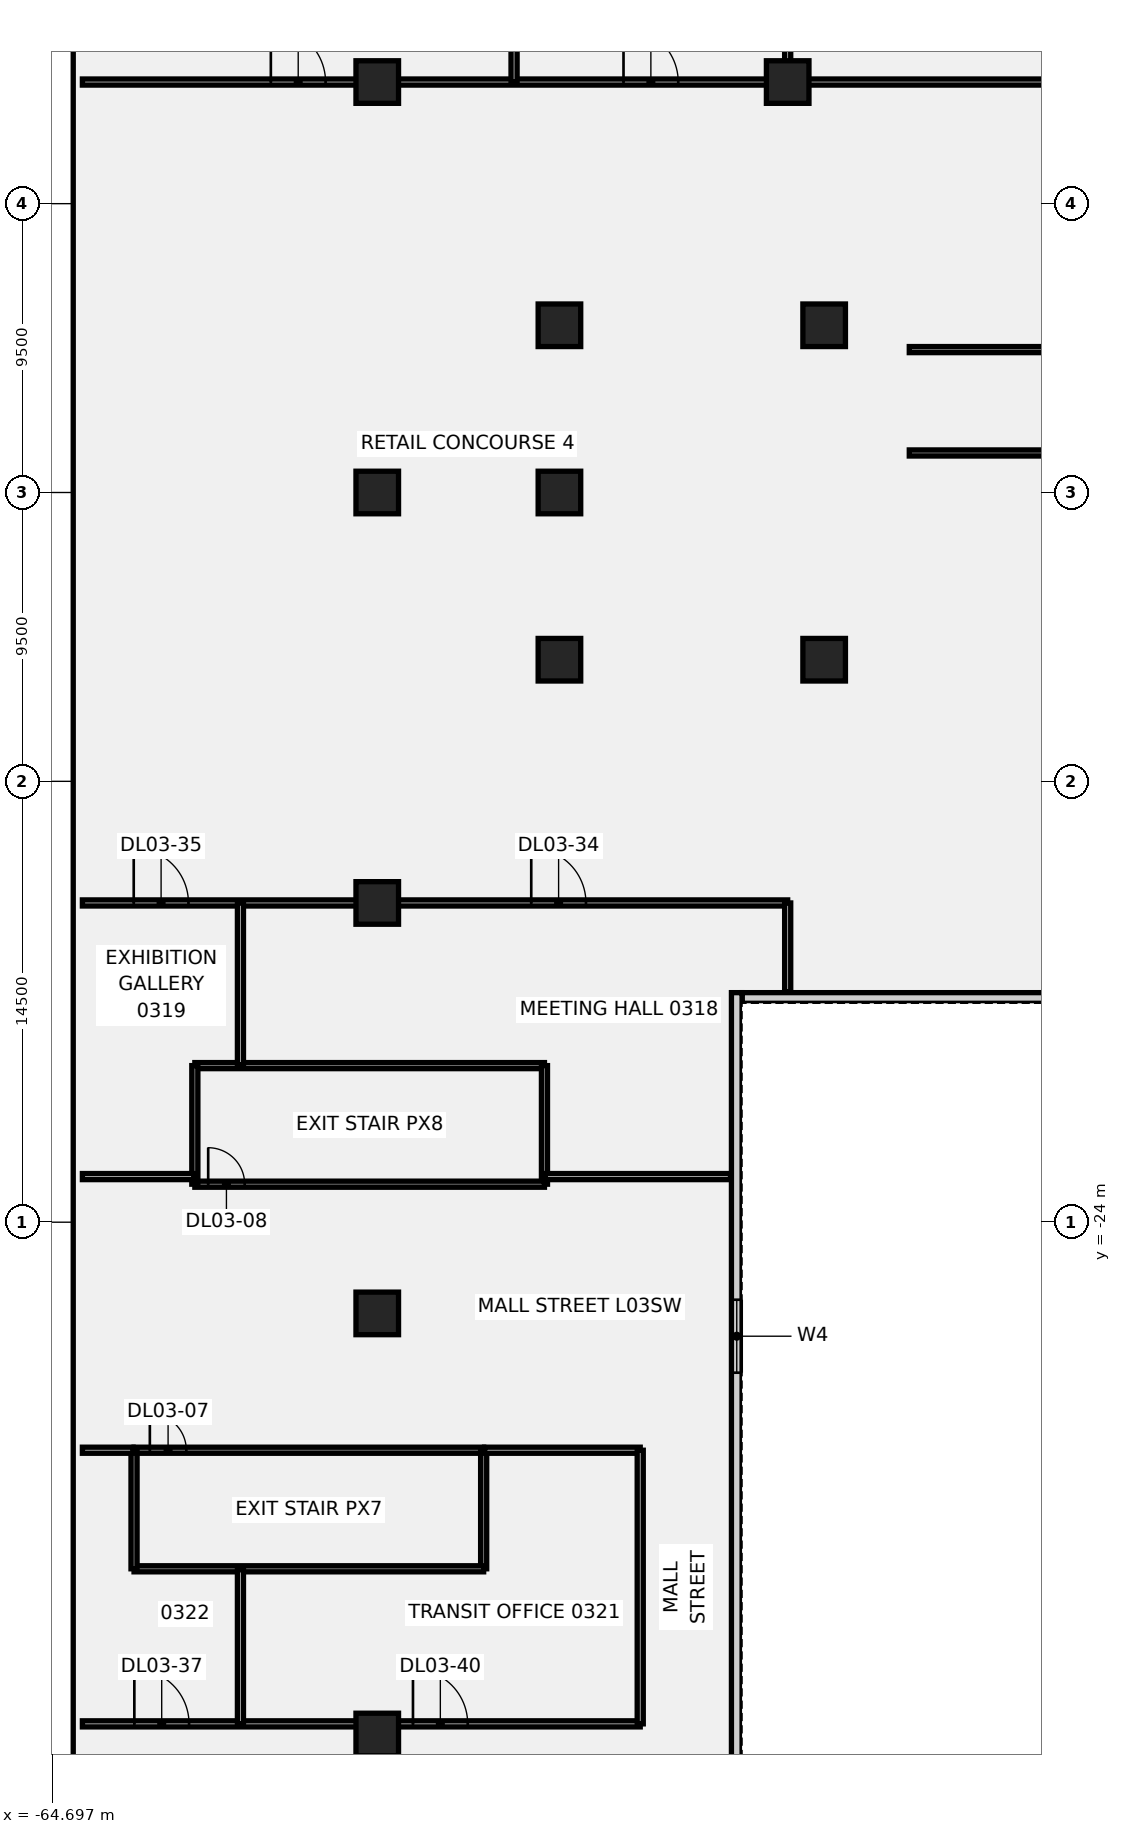
"""IFC4 building model, lengths in metres.
Left out: names, types, materials, properties, quantities, classifications, styles, units other than length and angle.
Written with IfcOpenShell. Run it as: python <this file> out.ifc"""

import sys

from ifc_helpers import new_model, si_unit, direction, frame, frame_2d, origin, origin_2d, place, context, subcontext, project, spatial, polyline, rectangle, outline, extrude, element, fill, save


model = new_model("IFC4")
c1 = context("Model", 3, precision=1e-05, world=origin(), true_north=direction((0.0, 1.0)))
c2 = subcontext(c1, "Body", "Model", "MODEL_VIEW")
j1 = project(units=[si_unit("LENGTHUNIT", "METRE"), si_unit("PLANEANGLEUNIT", "RADIAN")], contexts=[c1])
p1 = place(None, origin())
s1 = spatial("IfcSite", under=j1, at=p1, CompositionType="ELEMENT")
p2 = place(p1, origin())
s2 = spatial("IfcBuilding", under=s1, at=p2, CompositionType="ELEMENT")
p3 = place(p2, frame((0.0, 0.0, 20.0)))
s3 = spatial("IfcBuildingStorey", under=s2, at=p3, CompositionType="ELEMENT", Elevation=20.0)
for number, where, z_axis, x_axis in (
    (1, (-39.3, -5.5, -0.5), (0.0, 0.0, 1.0), (1.0, 0.0, 0.0)),
    (2, (-39.3, 5.5, -0.5), (0.0, 0.0, 1.0), (1.0, 0.0, 0.0)),
    (3, (-48.008, 5.5, -0.5), (0.0, 0.0, 1.0), (1.0, 0.0, 0.0)),
    (4, (-48.008, 0.0, -0.5), (0.0, 0.0, 1.0), (1.0, 0.0, 0.0)),
    (5, (-48.008, -5.5, -0.5), (0.0, 0.0, 1.0), (1.0, 0.0, 0.0)),
    (6, (-54.0, -40.85, -0.5), (0.0, 0.0, 1.0), (1.0, 0.0, 0.0)),
    (7, (-54.0, -27.0, -0.5), (0.0, 0.0, 1.0), (1.0, 0.0, 0.0)),
    (8, (-54.0, -13.5, -0.5), (0.0, 0.0, 1.0), (1.0, 0.0, 0.0)),
    (9, (-54.0, 0.0, -0.5), (0.0, 0.0, 1.0), (1.0, 0.0, 0.0)),
    (10, (-54.0, 13.5, -0.5), (0.0, 0.0, 1.0), (1.0, 0.0, 0.0)),
    (11, (-40.5, 13.5, -0.5), (0.0, 0.0, 1.0), (1.0, 0.0, 0.0)),
):
    element("IfcColumn", number, at=place(p3, frame(where, z_axis=z_axis, x_axis=x_axis)), inside=s3, PredefinedType="COLUMN", context=c2, shape_type="SweptSolid", body=[
        extrude(rectangle(XDim=1.4, YDim=1.4, at=origin_2d()), origin(), (0.0, 0.0, 1.0), 5.05),
    ])
p4 = place(p3, frame((-62.0, -31.5, 0.0), z_axis=(0.0, 0.0, 1.0), x_axis=(1.0, 0.0, 0.0)))
e12 = element("IfcWall", 12, at=p4, inside=s3, PredefinedType="PARTITIONING", context=c2, shape_type="SweptSolid", body=[
    extrude(rectangle(XDim=11.5, YDim=0.2, at=frame_2d((5.75, 0.0))), origin(), (0.0, 0.0, 1.0), 4.55),
])
p5 = place(p4, frame((0.52, 0.0, 0.0)))
e13 = element("IfcOpeningElement", 13, at=p5, cuts=e12, PredefinedType="OPENING", context=c2, shape_type="SweptSolid", body=[
    extrude(rectangle(XDim=1.2, YDim=2.1, at=frame_2d((0.6, 1.05))), frame((0.0, 0.11, 0.0), z_axis=(0.0, -1.0, 0.0), x_axis=(1.0, 0.0, 0.0)), (0.0, 0.0, 1.0), 0.22),
])
p6 = place(p3, frame((-50.5, -35.4, 0.0), z_axis=(0.0, 0.0, 1.0), x_axis=(0.0, 1.0, 0.0)))
e14 = element("IfcWall", 14, at=p6, inside=s3, PredefinedType="PARTITIONING", context=c2, shape_type="SweptSolid", body=[
    extrude(rectangle(XDim=3.9, YDim=0.2, at=frame_2d((1.95, 0.0))), origin(), (0.0, 0.0, 1.0), 4.55),
])
p7 = place(p3, frame((-62.0, -35.4, 0.0), z_axis=(0.0, 0.0, 1.0), x_axis=(1.0, 0.0, 0.0)))
e15 = element("IfcWall", 15, at=p7, inside=s3, PredefinedType="PARTITIONING", context=c2, shape_type="SweptSolid", body=[
    extrude(rectangle(XDim=11.5, YDim=0.2, at=frame_2d((5.75, 0.0))), origin(), (0.0, 0.0, 1.0), 4.55),
])
p8 = place(p3, frame((-62.0, -35.4, 0.0), z_axis=(0.0, 0.0, 1.0), x_axis=(0.0, 1.0, 0.0)))
e16 = element("IfcWall", 16, at=p8, inside=s3, PredefinedType="PARTITIONING", context=c2, shape_type="SweptSolid", body=[
    extrude(rectangle(XDim=3.9, YDim=0.2, at=frame_2d((1.95, 0.0))), origin(), (0.0, 0.0, 1.0), 4.55),
])
p9 = place(p3, frame((-60.0, -18.85, 0.0), z_axis=(0.0, 0.0, 1.0), x_axis=(1.0, 0.0, 0.0)))
e17 = element("IfcWall", 17, at=p9, inside=s3, PredefinedType="PARTITIONING", context=c2, shape_type="SweptSolid", body=[
    extrude(rectangle(XDim=11.5, YDim=0.2, at=frame_2d((5.75, 0.0))), origin(), (0.0, 0.0, 1.0), 4.55),
])
p10 = place(p3, frame((-48.5, -22.75, 0.0), z_axis=(0.0, 0.0, 1.0), x_axis=(0.0, 1.0, 0.0)))
e18 = element("IfcWall", 18, at=p10, inside=s3, PredefinedType="PARTITIONING", context=c2, shape_type="SweptSolid", body=[
    extrude(rectangle(XDim=3.9, YDim=0.2, at=frame_2d((1.95, 0.0))), origin(), (0.0, 0.0, 1.0), 4.55),
])
p11 = place(p3, frame((-60.0, -22.75, 0.0), z_axis=(0.0, 0.0, 1.0), x_axis=(1.0, 0.0, 0.0)))
e19 = element("IfcWall", 19, at=p11, inside=s3, PredefinedType="PARTITIONING", context=c2, shape_type="SweptSolid", body=[
    extrude(rectangle(XDim=11.5, YDim=0.2, at=frame_2d((5.75, 0.0))), origin(), (0.0, 0.0, 1.0), 4.55),
])
p12 = place(p11, frame((0.439, 0.0, 0.0)))
e20 = element("IfcOpeningElement", 20, at=p12, cuts=e19, PredefinedType="OPENING", context=c2, shape_type="SweptSolid", body=[
    extrude(rectangle(XDim=1.2, YDim=2.1, at=frame_2d((0.6, 1.05))), frame((0.0, 0.11, 0.0), z_axis=(0.0, -1.0, 0.0), x_axis=(1.0, 0.0, 0.0)), (0.0, 0.0, 1.0), 0.22),
])
p13 = place(p3, frame((-60.0, -22.75, 0.0), z_axis=(0.0, 0.0, 1.0), x_axis=(0.0, 1.0, 0.0)))
e21 = element("IfcWall", 21, at=p13, inside=s3, PredefinedType="PARTITIONING", context=c2, shape_type="SweptSolid", body=[
    extrude(rectangle(XDim=3.9, YDim=0.2, at=frame_2d((1.95, 0.0))), origin(), (0.0, 0.0, 1.0), 4.55),
])
p14 = place(p3, frame((-63.699, -40.5, 0.0), z_axis=(0.0, 0.0, 1.0), x_axis=(1.0, 0.0, 0.0)))
e22 = element("IfcWall", 22, at=p14, inside=s3, PredefinedType="PARTITIONING", context=c2, shape_type="SweptSolid", body=[
    extrude(rectangle(XDim=18.349, YDim=0.2, at=frame_2d((9.174, 0.0))), origin(), (0.0, 0.0, 1.0), 4.55),
])
p15 = place(p14, frame((1.709, 0.0, 0.0)))
e23 = element("IfcOpeningElement", 23, at=p15, cuts=e22, PredefinedType="OPENING", context=c2, shape_type="SweptSolid", body=[
    extrude(rectangle(XDim=1.8, YDim=2.1, at=frame_2d((0.9, 1.05))), frame((0.0, 0.11, 0.0), z_axis=(0.0, -1.0, 0.0), x_axis=(1.0, 0.0, 0.0)), (0.0, 0.0, 1.0), 0.22),
])
p16 = place(p14, frame((10.874, 0.0, 0.0)))
e24 = element("IfcOpeningElement", 24, at=p16, cuts=e22, PredefinedType="OPENING", context=c2, shape_type="SweptSolid", body=[
    extrude(rectangle(XDim=1.8, YDim=2.1, at=frame_2d((0.9, 1.05))), frame((0.0, 0.11, 0.0), z_axis=(0.0, -1.0, 0.0), x_axis=(1.0, 0.0, 0.0)), (0.0, 0.0, 1.0), 0.22),
])
p17 = place(p3, frame((-63.699, -31.5, 0.0), z_axis=(0.0, 0.0, 1.0), x_axis=(1.0, 0.0, 0.0)))
e25 = element("IfcWall", 25, at=p17, inside=s3, PredefinedType="PARTITIONING", context=c2, shape_type="SweptSolid", body=[
    extrude(rectangle(XDim=1.669, YDim=0.2, at=frame_2d((0.834, 0.0))), origin(), (0.0, 0.0, 1.0), 4.55),
])
p18 = place(p3, frame((-63.699, -22.5, 0.0), z_axis=(0.0, 0.0, 1.0), x_axis=(1.0, 0.0, 0.0)))
e26 = element("IfcWall", 26, at=p18, inside=s3, PredefinedType="PARTITIONING", context=c2, shape_type="SweptSolid", body=[
    extrude(rectangle(XDim=3.669, YDim=0.2, at=frame_2d((1.834, 0.0))), origin(), (0.0, 0.0, 1.0), 4.55),
])
p19 = place(p3, frame((-63.699, -13.5, 0.0), z_axis=(0.0, 0.0, 1.0), x_axis=(1.0, 0.0, 0.0)))
e27 = element("IfcWall", 27, at=p19, inside=s3, PredefinedType="PARTITIONING", context=c2, shape_type="SweptSolid", body=[
    extrude(rectangle(XDim=23.199, YDim=0.2, at=frame_2d((11.6, 0.0))), origin(), (0.0, 0.0, 1.0), 4.55),
])
p20 = place(p19, frame((14.764, 0.0, 0.0)))
e28 = element("IfcOpeningElement", 28, at=p20, cuts=e27, PredefinedType="OPENING", context=c2, shape_type="SweptSolid", body=[
    extrude(rectangle(XDim=1.8, YDim=2.1, at=frame_2d((0.9, 1.05))), frame((0.0, 0.11, 0.0), z_axis=(0.0, -1.0, 0.0), x_axis=(1.0, 0.0, 0.0)), (0.0, 0.0, 1.0), 0.22),
])
p21 = place(p19, frame((1.689, 0.0, 0.0)))
e29 = element("IfcOpeningElement", 29, at=p21, cuts=e27, PredefinedType="OPENING", context=c2, shape_type="SweptSolid", body=[
    extrude(rectangle(XDim=1.8, YDim=2.1, at=frame_2d((0.9, 1.05))), frame((0.0, 0.11, 0.0), z_axis=(0.0, -1.0, 0.0), x_axis=(1.0, 0.0, 0.0)), (0.0, 0.0, 1.0), 0.22),
])
p22 = place(p3, frame((-63.699, 13.5, 0.0), z_axis=(0.0, 0.0, 1.0), x_axis=(1.0, 0.0, 0.0)))
e30 = element("IfcWall", 30, at=p22, inside=s3, PredefinedType="PARTITIONING", context=c2, shape_type="SweptSolid", body=[
    extrude(rectangle(XDim=41.199, YDim=0.2, at=frame_2d((20.6, 0.0))), origin(), (0.0, 0.0, 1.0), 4.55),
])
p23 = place(p22, frame((17.799, 0.0, 0.0)))
e31 = element("IfcOpeningElement", 31, at=p23, cuts=e30, PredefinedType="OPENING", context=c2, shape_type="SweptSolid", body=[
    extrude(rectangle(XDim=1.8, YDim=2.1, at=frame_2d((0.9, 1.05))), frame((0.0, 0.11, 0.0), z_axis=(0.0, -1.0, 0.0), x_axis=(1.0, 0.0, 0.0)), (0.0, 0.0, 1.0), 0.22),
])
p24 = place(p22, frame((6.199, 0.0, 0.0)))
e32 = element("IfcOpeningElement", 32, at=p24, cuts=e30, PredefinedType="OPENING", context=c2, shape_type="SweptSolid", body=[
    extrude(rectangle(XDim=1.8, YDim=2.1, at=frame_2d((0.9, 1.05))), frame((0.0, 0.11, 0.0), z_axis=(0.0, -1.0, 0.0), x_axis=(1.0, 0.0, 0.0)), (0.0, 0.0, 1.0), 0.22),
])
p25 = place(p3, frame((-50.47, -31.5, 0.0), z_axis=(0.0, 0.0, 1.0), x_axis=(1.0, 0.0, 0.0)))
e33 = element("IfcWall", 33, at=p25, inside=s3, PredefinedType="PARTITIONING", context=c2, shape_type="SweptSolid", body=[
    extrude(rectangle(XDim=5.12, YDim=0.2, at=frame_2d((2.56, 0.0))), origin(), (0.0, 0.0, 1.0), 4.55),
])
p26 = place(p3, frame((-45.35, -40.5, 0.0), z_axis=(0.0, 0.0, 1.0), x_axis=(0.0, 1.0, 0.0)))
e34 = element("IfcWall", 34, at=p26, inside=s3, PredefinedType="PARTITIONING", context=c2, shape_type="SweptSolid", body=[
    extrude(rectangle(XDim=9.0, YDim=0.2, at=frame_2d((4.5, 0.0))), origin(), (0.0, 0.0, 1.0), 4.55),
])
p27 = place(p3, frame((-58.5, -40.5, 0.0), z_axis=(0.0, 0.0, 1.0), x_axis=(0.0, 1.0, 0.0)))
e35 = element("IfcWall", 35, at=p27, inside=s3, PredefinedType="PARTITIONING", context=c2, shape_type="SweptSolid", body=[
    extrude(rectangle(XDim=5.07, YDim=0.2, at=frame_2d((2.535, 0.0))), origin(), (0.0, 0.0, 1.0), 4.55),
])
p28 = place(p3, frame((-58.5, -18.82, 0.0), z_axis=(0.0, 0.0, 1.0), x_axis=(0.0, 1.0, 0.0)))
e36 = element("IfcWall", 36, at=p28, inside=s3, PredefinedType="PARTITIONING", context=c2, shape_type="SweptSolid", body=[
    extrude(rectangle(XDim=5.32, YDim=0.2, at=frame_2d((2.66, 0.0))), origin(), (0.0, 0.0, 1.0), 4.55),
])
p29 = place(p3, frame((-40.5, -16.42, 0.0), z_axis=(0.0, 0.0, 1.0), x_axis=(0.0, 1.0, 0.0)))
e37 = element("IfcWall", 37, at=p29, inside=s3, PredefinedType="PARTITIONING", context=c2, shape_type="SweptSolid", body=[
    extrude(rectangle(XDim=2.92, YDim=0.2, at=frame_2d((1.46, 0.0))), origin(), (0.0, 0.0, 1.0), 4.55),
])
p30 = place(p3, frame((-49.5, 13.5, 0.0), z_axis=(0.0, 0.0, 1.0), x_axis=(0.0, 1.0, 0.0)))
e38 = element("IfcWall", 38, at=p30, inside=s3, PredefinedType="PARTITIONING", context=c2, shape_type="SweptSolid", body=[
    extrude(rectangle(XDim=9.0, YDim=0.2, at=frame_2d((4.5, 0.0))), origin(), (0.0, 0.0, 1.0), 4.55),
])
p31 = place(p3, frame((-48.47, -22.5, 0.0), z_axis=(0.0, 0.0, 1.0), x_axis=(1.0, 0.0, 0.0)))
e39 = element("IfcWall", 39, at=p31, inside=s3, PredefinedType="PARTITIONING", context=c2, shape_type="SweptSolid", body=[
    extrude(rectangle(XDim=6.09, YDim=0.2, at=frame_2d((3.045, 0.0))), origin(), (0.0, 0.0, 1.0), 4.55),
])
p32 = place(p3, frame((-40.5, 13.5, 0.0), z_axis=(0.0, 0.0, 1.0), x_axis=(0.0, 1.0, 0.0)))
e40 = element("IfcWall", 40, at=p32, inside=s3, PredefinedType="PARTITIONING", context=c2, shape_type="SweptSolid", body=[
    extrude(rectangle(XDim=9.0, YDim=0.2, at=frame_2d((4.5, 0.0))), origin(), (0.0, 0.0, 1.0), 4.55),
])
p33 = place(p3, frame((-42.0, -16.625, 0.0), z_axis=(0.0, 0.0, 1.0), x_axis=(1.0, 0.0, 0.0)))
e41 = element("IfcWall", 41, at=p33, inside=s3, PredefinedType="SOLIDWALL", context=c2, shape_type="SweptSolid", body=[
    extrude(rectangle(XDim=18.0, YDim=0.35, at=frame_2d((9.0, 0.0))), origin(), (0.0, 0.0, 1.0), 4.55),
])
p34 = place(p33, frame((13.95, 0.0, 1.0)))
e42 = element("IfcOpeningElement", 42, at=p34, cuts=e41, PredefinedType="OPENING", context=c2, shape_type="SweptSolid", body=[
    extrude(rectangle(XDim=2.4, YDim=1.8, at=frame_2d((1.2, 0.9))), frame((0.0, 0.185, 0.0), z_axis=(0.0, -1.0, 0.0), x_axis=(1.0, 0.0, 0.0)), (0.0, 0.0, 1.0), 0.37),
])
p35 = place(p3, frame((-42.175, -43.85, 0.0), z_axis=(0.0, 0.0, 1.0), x_axis=(0.0, 1.0, 0.0)))
e43 = element("IfcWall", 43, at=p35, inside=s3, PredefinedType="SOLIDWALL", context=c2, shape_type="SweptSolid", body=[
    extrude(rectangle(XDim=27.4, YDim=0.35, at=frame_2d((13.7, 0.0))), origin(), (0.0, 0.0, 1.0), 4.55),
])
p36 = place(p35, frame((14.9, 0.0, 1.0)))
e44 = element("IfcOpeningElement", 44, at=p36, cuts=e43, PredefinedType="OPENING", context=c2, shape_type="SweptSolid", body=[
    extrude(rectangle(XDim=2.4, YDim=1.8, at=frame_2d((1.2, 0.9))), frame((0.0, 0.185, 0.0), z_axis=(0.0, -1.0, 0.0), x_axis=(1.0, 0.0, 0.0)), (0.0, 0.0, 1.0), 0.37),
])
p37 = place(p3, frame((-29.8, 1.3, 0.0), z_axis=(0.0, 0.0, 1.0), x_axis=(-1.0, 0.0, 0.0)))
e45 = element("IfcWall", 45, at=p37, inside=s3, PredefinedType="SHEAR", context=c2, shape_type="SweptSolid", body=[
    extrude(rectangle(XDim=6.7, YDim=0.2, at=frame_2d((3.35, 0.0))), origin(), (0.0, 0.0, 1.0), 4.55),
])
p38 = place(p37, frame((0.35, 0.0, 0.0)))
e46 = element("IfcOpeningElement", 46, at=p38, cuts=e45, PredefinedType="OPENING", context=c2, shape_type="SweptSolid", body=[
    extrude(rectangle(XDim=1.0, YDim=2.1, at=frame_2d((0.5, 1.05))), frame((0.0, 0.11, 0.0), z_axis=(0.0, -1.0, 0.0), x_axis=(1.0, 0.0, 0.0)), (0.0, 0.0, 1.0), 0.22),
])
p39 = place(p3, frame((-29.8, 4.7, 0.0), z_axis=(0.0, 0.0, 1.0), x_axis=(-1.0, 0.0, 0.0)))
e47 = element("IfcWall", 47, at=p39, inside=s3, PredefinedType="SHEAR", context=c2, shape_type="SweptSolid", body=[
    extrude(rectangle(XDim=6.7, YDim=0.2, at=frame_2d((3.35, 0.0))), origin(), (0.0, 0.0, 1.0), 4.55),
])
p40 = place(p3, origin())
e48 = element("IfcWall", 48, at=p40, inside=s3, PredefinedType="SHEAR", context=c2, shape_type="SweptSolid", body=[
    extrude(outline(polyline([(-36.3, 4.6), (-36.5, 4.6), (-36.5, 1.4), (-36.3, 1.4), (-36.3, 4.6)])), origin(), (0.0, 0.0, 1.0), 4.55),
])
p41 = place(p5, origin())
e49 = element("IfcDoor", 49, at=p41, inside=s3, OperationType="SINGLE_SWING_LEFT", PredefinedType="DOOR", context=c2, shape_type="SweptSolid", body=[
    extrude(rectangle(XDim=1.2, YDim=2.1, at=frame_2d((0.6, 1.05))), frame((0.0, 0.025, 0.0), z_axis=(0.0, -1.0, 0.0), x_axis=(1.0, 0.0, 0.0)), (0.0, 0.0, 1.0), 0.05),
])
fill(e13, e49)
p42 = place(p12, origin())
e50 = element("IfcDoor", 50, at=p42, inside=s3, OperationType="SINGLE_SWING_RIGHT", PredefinedType="DOOR", context=c2, shape_type="SweptSolid", body=[
    extrude(rectangle(XDim=1.2, YDim=2.1, at=frame_2d((0.6, 1.05))), frame((0.0, 0.025, 0.0), z_axis=(0.0, -1.0, 0.0), x_axis=(1.0, 0.0, 0.0)), (0.0, 0.0, 1.0), 0.05),
])
fill(e20, e50)
p43 = place(p23, origin())
e51 = element("IfcDoor", 51, at=p43, inside=s3, OperationType="SINGLE_SWING_LEFT", PredefinedType="DOOR", context=c2, shape_type="SweptSolid", body=[
    extrude(rectangle(XDim=1.8, YDim=2.1, at=frame_2d((0.9, 1.05))), frame((0.0, 0.025, 0.0), z_axis=(0.0, -1.0, 0.0), x_axis=(1.0, 0.0, 0.0)), (0.0, 0.0, 1.0), 0.05),
])
fill(e31, e51)
p44 = place(p24, origin())
e52 = element("IfcDoor", 52, at=p44, inside=s3, OperationType="SINGLE_SWING_RIGHT", PredefinedType="DOOR", context=c2, shape_type="SweptSolid", body=[
    extrude(rectangle(XDim=1.8, YDim=2.1, at=frame_2d((0.9, 1.05))), frame((0.0, 0.025, 0.0), z_axis=(0.0, -1.0, 0.0), x_axis=(1.0, 0.0, 0.0)), (0.0, 0.0, 1.0), 0.05),
])
fill(e32, e52)
p45 = place(p20, origin())
e53 = element("IfcDoor", 53, at=p45, inside=s3, OperationType="SINGLE_SWING_RIGHT", PredefinedType="DOOR", context=c2, shape_type="SweptSolid", body=[
    extrude(rectangle(XDim=1.8, YDim=2.1, at=frame_2d((0.9, 1.05))), frame((0.0, 0.025, 0.0), z_axis=(0.0, -1.0, 0.0), x_axis=(1.0, 0.0, 0.0)), (0.0, 0.0, 1.0), 0.05),
])
fill(e28, e53)
p46 = place(p21, origin())
e54 = element("IfcDoor", 54, at=p46, inside=s3, OperationType="SINGLE_SWING_LEFT", PredefinedType="DOOR", context=c2, shape_type="SweptSolid", body=[
    extrude(rectangle(XDim=1.8, YDim=2.1, at=frame_2d((0.9, 1.05))), frame((0.0, 0.025, 0.0), z_axis=(0.0, -1.0, 0.0), x_axis=(1.0, 0.0, 0.0)), (0.0, 0.0, 1.0), 0.05),
])
fill(e29, e54)
p47 = place(p15, origin())
e55 = element("IfcDoor", 55, at=p47, inside=s3, OperationType="SINGLE_SWING_LEFT", PredefinedType="DOOR", context=c2, shape_type="SweptSolid", body=[
    extrude(rectangle(XDim=1.8, YDim=2.1, at=frame_2d((0.9, 1.05))), frame((0.0, 0.025, 0.0), z_axis=(0.0, -1.0, 0.0), x_axis=(1.0, 0.0, 0.0)), (0.0, 0.0, 1.0), 0.05),
])
fill(e23, e55)
p48 = place(p16, origin())
e56 = element("IfcDoor", 56, at=p48, inside=s3, OperationType="SINGLE_SWING_RIGHT", PredefinedType="DOOR", context=c2, shape_type="SweptSolid", body=[
    extrude(rectangle(XDim=1.8, YDim=2.1, at=frame_2d((0.9, 1.05))), frame((0.0, 0.025, 0.0), z_axis=(0.0, -1.0, 0.0), x_axis=(1.0, 0.0, 0.0)), (0.0, 0.0, 1.0), 0.05),
])
fill(e24, e56)
p49 = place(p36, origin())
e57 = element("IfcWindow", 57, at=p49, inside=s3, PartitioningType="SINGLE_PANEL", PredefinedType="WINDOW", context=c2, shape_type="SweptSolid", body=[
    extrude(rectangle(XDim=2.4, YDim=1.8, at=frame_2d((1.2, 0.9))), frame((0.0, 0.03, 0.0), z_axis=(0.0, -1.0, 0.0), x_axis=(1.0, 0.0, 0.0)), (0.0, 0.0, 1.0), 0.06),
])
fill(e44, e57)
save(model, sys.argv[1])
